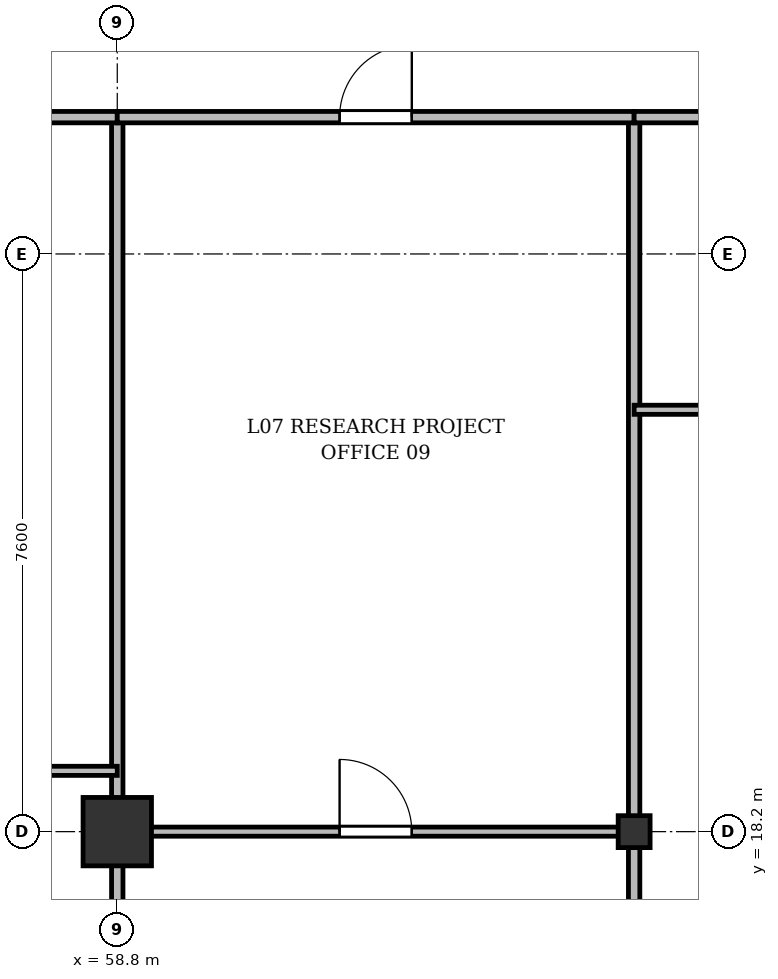
"""IFC4 building model, lengths in metres.
Left out: names, types, materials, properties, quantities, classifications, styles, units other than length and angle.
Written with IfcOpenShell. Run it as: python <this file> out.ifc"""

import sys

from ifc_helpers import new_model, si_unit, direction, frame, frame_2d, origin, origin_2d, place, context, subcontext, project, spatial, rectangle, i_section, extrude, source, transform, mapped, element, fill, save


model = new_model("IFC4")
c1 = context("Model", 3, precision=1e-05, world=origin(), true_north=direction((0.0, 1.0)))
c2 = subcontext(c1, "Body", "Model", "MODEL_VIEW")
j1 = project(units=[si_unit("LENGTHUNIT", "METRE"), si_unit("PLANEANGLEUNIT", "RADIAN")], contexts=[c1])
p1 = place(None, origin())
s1 = spatial("IfcSite", under=j1, at=p1, CompositionType="ELEMENT")
p2 = place(p1, origin())
s2 = spatial("IfcBuilding", under=s1, at=p2, CompositionType="ELEMENT")
p3 = place(p2, frame((0.0, 0.0, 30.7)))
s3 = spatial("IfcBuildingStorey", under=s2, at=p3, CompositionType="ELEMENT", Elevation=30.7)
m1 = source(origin(), c2, "Body", "SweptSolid", [
    extrude(rectangle(XDim=0.9, YDim=0.9, at=origin_2d()), origin(), (0.0, 0.0, 1.0), 3.6),
])
p4 = place(p3, frame((58.8, 18.2, 0.0), z_axis=(0.0, 0.0, 1.0), x_axis=(1.0, 0.0, 0.0)))
e1 = element("IfcColumn", 1, at=p4, inside=s3, PredefinedType="COLUMN", context=c2, shape_type="MappedRepresentation", body=[
    mapped(m1, transform((0.0, 0.0, 0.0), x_axis=(1.0, 0.0, 0.0), y_axis=(0.0, 1.0, 0.0), z_axis=(0.0, 0.0, 1.0), scale=1.0)),
])
m2 = source(origin(), c2, "Body", "SweptSolid", [
    extrude(i_section(OverallWidth=0.42, OverallDepth=0.42, WebThickness=0.026, FlangeThickness=0.04, at=origin_2d()), origin(), (0.0, 0.0, 1.0), 3.6),
])
p5 = place(p3, frame((65.6, 18.2, 0.0), z_axis=(0.0, 0.0, 1.0), x_axis=(1.0, 0.0, 0.0)))
e2 = element("IfcColumn", 2, at=p5, inside=s3, PredefinedType="COLUMN", context=c2, shape_type="MappedRepresentation", body=[
    mapped(m2, transform((0.0, 0.0, 0.0), x_axis=(1.0, 0.0, 0.0), y_axis=(0.0, 1.0, 0.0), z_axis=(0.0, 0.0, 1.0), scale=1.0)),
])
for number, where, z_axis, x_axis in (
    (3, (58.8, 3.145, 0.0), (0.0, 0.0, 1.0), (0.0, 1.0, 0.0)),
    (4, (65.6, 3.145, 0.0), (0.0, 0.0, 1.0), (0.0, 1.0, 0.0)),
):
    element("IfcWall", number, at=place(p3, frame(where, z_axis=z_axis, x_axis=x_axis)), inside=s3, PredefinedType="PARTITIONING", context=c2, shape_type="SweptSolid", body=[
        extrude(rectangle(XDim=24.455, YDim=0.15, at=frame_2d((12.228, 0.0))), origin(), (0.0, 0.0, 1.0), 2.752),
    ])
p6 = place(p3, frame((51.0, 19.0, 0.0), z_axis=(0.0, 0.0, 1.0), x_axis=(1.0, 0.0, 0.0)))
e5 = element("IfcWall", 5, at=p6, inside=s3, PredefinedType="PARTITIONING", context=c2, shape_type="SweptSolid", body=[
    extrude(rectangle(XDim=7.8, YDim=0.12, at=frame_2d((3.9, 0.0))), origin(), (0.0, 0.0, 1.0), 2.752),
])
p7 = place(p6, frame((3.333, 0.0, 0.0)))
e6 = element("IfcOpeningElement", 6, at=p7, cuts=e5, PredefinedType="OPENING", context=c2, shape_type="SweptSolid", body=[
    extrude(rectangle(XDim=0.95, YDim=2.15, at=frame_2d((0.475, 1.075))), frame((0.0, 0.07, 0.0), z_axis=(0.0, -1.0, 0.0), x_axis=(1.0, 0.0, 0.0)), (0.0, 0.0, 1.0), 0.14),
])
p8 = place(p3, frame((51.0, 27.6, 0.0), z_axis=(0.0, 0.0, 1.0), x_axis=(1.0, 0.0, 0.0)))
e7 = element("IfcWall", 7, at=p8, inside=s3, PredefinedType="PARTITIONING", context=c2, shape_type="SweptSolid", body=[
    extrude(rectangle(XDim=7.8, YDim=0.15, at=frame_2d((3.9, 0.0))), origin(), (0.0, 0.0, 1.0), 2.752),
])
p9 = place(p8, frame((5.172, 0.0, 0.0)))
e8 = element("IfcOpeningElement", 8, at=p9, cuts=e7, PredefinedType="OPENING", context=c2, shape_type="SweptSolid", body=[
    extrude(rectangle(XDim=0.95, YDim=2.15, at=frame_2d((0.475, 1.075))), frame((0.0, 0.085, 0.0), z_axis=(0.0, -1.0, 0.0), x_axis=(1.0, 0.0, 0.0)), (0.0, 0.0, 1.0), 0.17),
])
p10 = place(p3, frame((58.8, 27.6, 0.0), z_axis=(0.0, 0.0, 1.0), x_axis=(1.0, 0.0, 0.0)))
e9 = element("IfcWall", 9, at=p10, inside=s3, PredefinedType="PARTITIONING", context=c2, shape_type="SweptSolid", body=[
    extrude(rectangle(XDim=6.8, YDim=0.15, at=frame_2d((3.4, 0.0))), origin(), (0.0, 0.0, 1.0), 2.752),
])
p11 = place(p10, frame((2.925, 0.0, 0.0)))
e10 = element("IfcOpeningElement", 10, at=p11, cuts=e9, PredefinedType="OPENING", context=c2, shape_type="SweptSolid", body=[
    extrude(rectangle(XDim=0.95, YDim=2.15, at=frame_2d((0.475, 1.075))), frame((0.0, 0.085, 0.0), z_axis=(0.0, -1.0, 0.0), x_axis=(1.0, 0.0, 0.0)), (0.0, 0.0, 1.0), 0.17),
])
p12 = place(p3, frame((58.8, 18.2, 0.0), z_axis=(0.0, 0.0, 1.0), x_axis=(1.0, 0.0, 0.0)))
e11 = element("IfcWall", 11, at=p12, inside=s3, PredefinedType="PARTITIONING", context=c2, shape_type="SweptSolid", body=[
    extrude(rectangle(XDim=6.8, YDim=0.12, at=frame_2d((3.4, 0.0))), origin(), (0.0, 0.0, 1.0), 2.69),
])
p13 = place(p12, frame((2.925, 0.0, 0.0)))
e12 = element("IfcOpeningElement", 12, at=p13, cuts=e11, PredefinedType="OPENING", context=c2, shape_type="SweptSolid", body=[
    extrude(rectangle(XDim=0.95, YDim=2.15, at=frame_2d((0.475, 1.075))), frame((0.0, 0.07, 0.0), z_axis=(0.0, -1.0, 0.0), x_axis=(1.0, 0.0, 0.0)), (0.0, 0.0, 1.0), 0.14),
])
p14 = place(p3, frame((65.6, 27.6, 0.0), z_axis=(0.0, 0.0, 1.0), x_axis=(1.0, 0.0, 0.0)))
e13 = element("IfcWall", 13, at=p14, inside=s3, PredefinedType="PARTITIONING", context=c2, shape_type="SweptSolid", body=[
    extrude(rectangle(XDim=4.055, YDim=0.15, at=frame_2d((2.027, 0.0))), origin(), (0.0, 0.0, 1.0), 2.752),
])
p15 = place(p14, frame((1.462, 0.0, 0.0)))
e14 = element("IfcOpeningElement", 14, at=p15, cuts=e13, PredefinedType="OPENING", context=c2, shape_type="SweptSolid", body=[
    extrude(rectangle(XDim=0.95, YDim=2.15, at=frame_2d((0.475, 1.075))), frame((0.0, 0.085, 0.0), z_axis=(0.0, -1.0, 0.0), x_axis=(1.0, 0.0, 0.0)), (0.0, 0.0, 1.0), 0.17),
])
p16 = place(p3, frame((65.6, 23.75, 0.0), z_axis=(0.0, 0.0, 1.0), x_axis=(1.0, 0.0, 0.0)))
e15 = element("IfcWall", 15, at=p16, inside=s3, PredefinedType="PARTITIONING", context=c2, shape_type="SweptSolid", body=[
    extrude(rectangle(XDim=4.055, YDim=0.12, at=frame_2d((2.027, 0.0))), origin(), (0.0, 0.0, 1.0), 2.752),
])
p17 = place(p16, frame((1.462, 0.0, 0.0)))
e16 = element("IfcOpeningElement", 16, at=p17, cuts=e15, PredefinedType="OPENING", context=c2, shape_type="SweptSolid", body=[
    extrude(rectangle(XDim=0.95, YDim=2.15, at=frame_2d((0.475, 1.075))), frame((0.0, 0.07, 0.0), z_axis=(0.0, -1.0, 0.0), x_axis=(1.0, 0.0, 0.0)), (0.0, 0.0, 1.0), 0.14),
])
m3 = source(origin(), c2, "Body", "SweptSolid", [
    extrude(rectangle(XDim=0.95, YDim=2.15, at=frame_2d((0.475, 1.075))), frame((0.0, 0.025, 0.0), z_axis=(0.0, -1.0, 0.0), x_axis=(1.0, 0.0, 0.0)), (0.0, 0.0, 1.0), 0.05),
])
p18 = place(p11, origin())
e17 = element("IfcDoor", 17, at=p18, inside=s3, OperationType="SINGLE_SWING_RIGHT", PredefinedType="DOOR", context=c2, shape_type="MappedRepresentation", body=[
    mapped(m3, transform((0.0, 0.0, 0.0), x_axis=(1.0, 0.0, 0.0), y_axis=(0.0, 1.0, 0.0), z_axis=(0.0, 0.0, 1.0), scale=1.0)),
])
fill(e10, e17)
p19 = place(p13, origin())
e18 = element("IfcDoor", 18, at=p19, inside=s3, OperationType="SINGLE_SWING_LEFT", PredefinedType="DOOR", context=c2, shape_type="MappedRepresentation", body=[
    mapped(m3, transform((0.0, 0.0, 0.0), x_axis=(1.0, 0.0, 0.0), y_axis=(0.0, 1.0, 0.0), z_axis=(0.0, 0.0, 1.0), scale=1.0)),
])
fill(e12, e18)
save(model, sys.argv[1])
